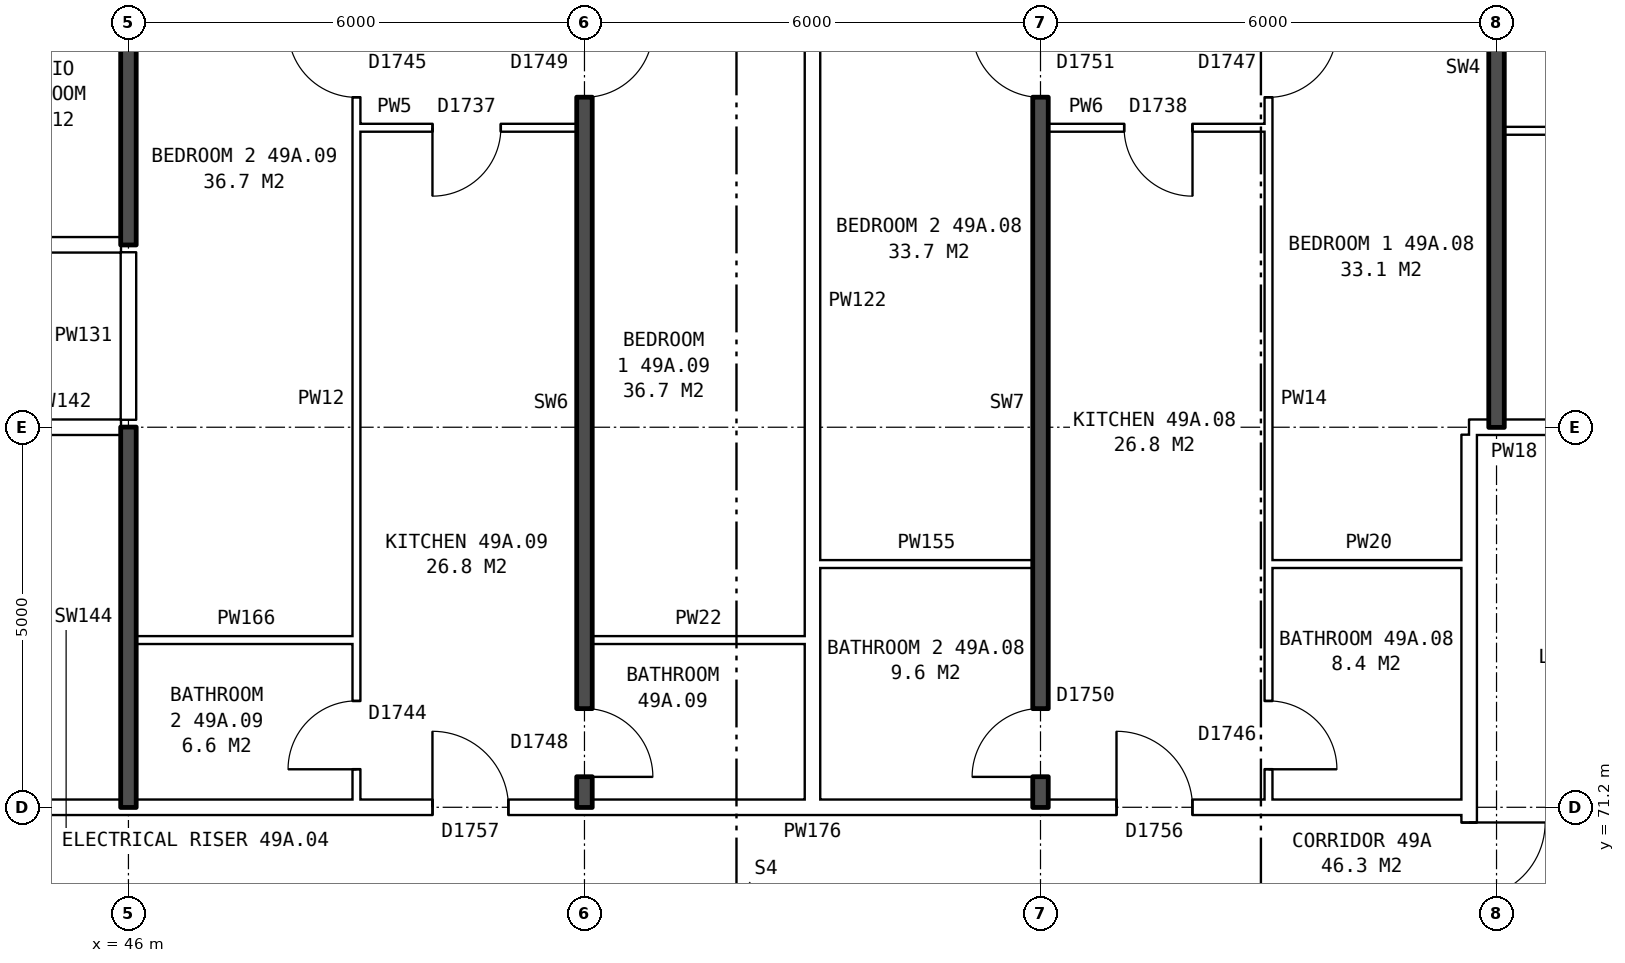
"""IFC4 building model, lengths in metres.
Left out: names, types, materials, properties, quantities, classifications, styles, units other than length and angle.
Written with IfcOpenShell. Run it as: python <this file> out.ifc"""

import sys

from ifc_helpers import new_model, si_unit, direction, frame, frame_2d, origin, place, context, subcontext, project, spatial, rectangle, extrude, element, fill, save


model = new_model("IFC4")
c1 = context("Model", 3, precision=1e-05, world=origin(), true_north=direction((0.0, 1.0)))
c2 = subcontext(c1, "Body", "Model", "MODEL_VIEW")
j1 = project(units=[si_unit("LENGTHUNIT", "METRE"), si_unit("PLANEANGLEUNIT", "RADIAN")], contexts=[c1])
p1 = place(None, origin())
s1 = spatial("IfcSite", under=j1, at=p1, CompositionType="ELEMENT")
p2 = place(p1, origin())
s2 = spatial("IfcBuilding", under=s1, at=p2, CompositionType="ELEMENT")
p3 = place(p2, frame((0.0, 0.0, 175.8)))
s3 = spatial("IfcBuildingStorey", under=s2, at=p3, CompositionType="ELEMENT", Elevation=175.8)
p4 = place(p3, frame((63.64, 63.9, 0.0), z_axis=(0.0, 0.0, 1.0), x_axis=(0.0, 1.0, 0.0)))
e1 = element("IfcWall", 1, at=p4, inside=s3, PredefinedType="PARTITIONING", context=c2, shape_type="SweptSolid", body=[
    extrude(rectangle(XDim=12.2, YDim=0.2, at=frame_2d((6.1, 0.0))), origin(), (0.0, 0.0, 1.0), 2.85),
])
p5 = place(p4, frame((5.1, 0.0, 0.0)))
e2 = element("IfcOpeningElement", 2, at=p5, cuts=e1, PredefinedType="OPENING", context=c2, shape_type="SweptSolid", body=[
    extrude(rectangle(XDim=2.0, YDim=2.1, at=frame_2d((1.0, 1.05))), frame((0.0, 0.11, 0.0), z_axis=(0.0, -1.0, 0.0), x_axis=(1.0, 0.0, 0.0)), (0.0, 0.0, 1.0), 0.22),
])
p6 = place(p3, frame((44.36, 71.2, 0.0), z_axis=(0.0, 0.0, 1.0), x_axis=(1.0, 0.0, 0.0)))
e3 = element("IfcWall", 3, at=p6, inside=s3, PredefinedType="PARTITIONING", context=c2, shape_type="SweptSolid", body=[
    extrude(rectangle(XDim=19.28, YDim=0.2, at=frame_2d((9.64, 0.0))), origin(), (0.0, 0.0, 1.0), 2.85),
])
p7 = place(p6, frame((14.64, 0.0, 0.0)))
e4 = element("IfcOpeningElement", 4, at=p7, cuts=e3, PredefinedType="OPENING", context=c2, shape_type="SweptSolid", body=[
    extrude(rectangle(XDim=1.0, YDim=2.1, at=frame_2d((0.5, 1.05))), frame((0.0, 0.11, 0.0), z_axis=(0.0, -1.0, 0.0), x_axis=(1.0, 0.0, 0.0)), (0.0, 0.0, 1.0), 0.22),
])
p8 = place(p6, frame((5.64, 0.0, 0.0)))
e5 = element("IfcOpeningElement", 5, at=p8, cuts=e3, PredefinedType="OPENING", context=c2, shape_type="SweptSolid", body=[
    extrude(rectangle(XDim=1.0, YDim=2.1, at=frame_2d((0.5, 1.05))), frame((0.0, 0.11, 0.0), z_axis=(0.0, -1.0, 0.0), x_axis=(1.0, 0.0, 0.0)), (0.0, 0.0, 1.0), 0.22),
])
p9 = place(p3, frame((46.1, 73.4, 0.0), z_axis=(0.0, 0.0, 1.0), x_axis=(1.0, 0.0, 0.0)))
e6 = element("IfcWall", 6, at=p9, inside=s3, PredefinedType="PARTITIONING", context=c2, shape_type="SweptSolid", body=[
    extrude(rectangle(XDim=2.9, YDim=0.1, at=frame_2d((1.45, 0.0))), origin(), (0.0, 0.0, 1.0), 2.85),
])
for number, where, z_axis, x_axis in (
    (7, (52.1, 73.4, 0.0), (0.0, 0.0, 1.0), (1.0, 0.0, 0.0)),
    (8, (55.1, 74.4, 0.0), (0.0, 0.0, 1.0), (1.0, 0.0, 0.0)),
):
    element("IfcWall", number, at=place(p3, frame(where, z_axis=z_axis, x_axis=x_axis)), inside=s3, PredefinedType="PARTITIONING", context=c2, shape_type="SweptSolid", body=[
        extrude(rectangle(XDim=2.8, YDim=0.1, at=frame_2d((1.4, 0.0))), origin(), (0.0, 0.0, 1.0), 2.85),
    ])
p10 = place(p3, frame((61.0, 74.4, 0.0), z_axis=(0.0, 0.0, 1.0), x_axis=(1.0, 0.0, 0.0)))
e9 = element("IfcWall", 9, at=p10, inside=s3, PredefinedType="PARTITIONING", context=c2, shape_type="SweptSolid", body=[
    extrude(rectangle(XDim=2.64, YDim=0.1, at=frame_2d((1.32, 0.0))), origin(), (0.0, 0.0, 1.0), 2.85),
])
p11 = place(p3, frame((44.36, 76.2, 0.0), z_axis=(0.0, 0.0, 1.0), x_axis=(1.0, 0.0, 0.0)))
e10 = element("IfcWall", 10, at=p11, inside=s3, PredefinedType="PARTITIONING", context=c2, shape_type="SweptSolid", body=[
    extrude(rectangle(XDim=1.54, YDim=0.2, at=frame_2d((0.77, 0.0))), origin(), (0.0, 0.0, 1.0), 2.85),
])
p12 = place(p3, frame((63.64, 76.2, 0.0), z_axis=(0.0, 0.0, 1.0), x_axis=(1.0, 0.0, 0.0)))
e11 = element("IfcWall", 11, at=p12, inside=s3, PredefinedType="PARTITIONING", context=c2, shape_type="SweptSolid", body=[
    extrude(rectangle(XDim=3.0, YDim=0.2, at=frame_2d((1.5, 0.0))), origin(), (0.0, 0.0, 1.0), 2.85),
])
p13 = place(p12, frame((1.18, 0.0, 0.0)))
e12 = element("IfcOpeningElement", 12, at=p13, cuts=e11, PredefinedType="OPENING", context=c2, shape_type="SweptSolid", body=[
    extrude(rectangle(XDim=1.0, YDim=2.1, at=frame_2d((0.5, 1.05))), frame((0.0, 0.11, 0.0), z_axis=(0.0, -1.0, 0.0), x_axis=(1.0, 0.0, 0.0)), (0.0, 0.0, 1.0), 0.22),
])
p14 = place(p3, frame((30.61, 78.6, 0.0), z_axis=(0.0, 0.0, 1.0), x_axis=(1.0, 0.0, 0.0)))
e13 = element("IfcWall", 13, at=p14, inside=s3, PredefinedType="PARTITIONING", context=c2, shape_type="SweptSolid", body=[
    extrude(rectangle(XDim=15.29, YDim=0.2, at=frame_2d((7.645, 0.0))), origin(), (0.0, 0.0, 1.0), 2.85),
])
p15 = place(p14, frame((10.69, 0.0, 0.0)))
e14 = element("IfcOpeningElement", 14, at=p15, cuts=e13, PredefinedType="OPENING", context=c2, shape_type="SweptSolid", body=[
    extrude(rectangle(XDim=1.0, YDim=2.1, at=frame_2d((0.5, 1.05))), frame((0.0, 0.11, 0.0), z_axis=(0.0, -1.0, 0.0), x_axis=(1.0, 0.0, 0.0)), (0.0, 0.0, 1.0), 0.22),
])
p16 = place(p14, frame((5.89, 0.0, 0.0)))
e15 = element("IfcOpeningElement", 15, at=p16, cuts=e13, PredefinedType="OPENING", context=c2, shape_type="SweptSolid", body=[
    extrude(rectangle(XDim=1.0, YDim=2.1, at=frame_2d((0.5, 1.05))), frame((0.0, 0.11, 0.0), z_axis=(0.0, -1.0, 0.0), x_axis=(1.0, 0.0, 0.0)), (0.0, 0.0, 1.0), 0.22),
])
p17 = place(p3, frame((64.1, 80.1, 0.0), z_axis=(0.0, 0.0, 1.0), x_axis=(1.0, 0.0, 0.0)))
e16 = element("IfcWall", 16, at=p17, inside=s3, PredefinedType="PARTITIONING", context=c2, shape_type="SweptSolid", body=[
    extrude(rectangle(XDim=5.8, YDim=0.1, at=frame_2d((2.9, 0.0))), origin(), (0.0, 0.0, 1.0), 2.85),
])
p18 = place(p17, frame((3.6, 0.0, 0.0)))
e17 = element("IfcOpeningElement", 17, at=p18, cuts=e16, PredefinedType="OPENING", context=c2, shape_type="SweptSolid", body=[
    extrude(rectangle(XDim=0.9, YDim=2.1, at=frame_2d((0.45, 1.05))), frame((0.0, 0.06, 0.0), z_axis=(0.0, -1.0, 0.0), x_axis=(1.0, 0.0, 0.0)), (0.0, 0.0, 1.0), 0.12),
])
p19 = place(p17, frame((0.7, 0.0, 0.0)))
e18 = element("IfcOpeningElement", 18, at=p19, cuts=e16, PredefinedType="OPENING", context=c2, shape_type="SweptSolid", body=[
    extrude(rectangle(XDim=0.9, YDim=2.1, at=frame_2d((0.45, 1.05))), frame((0.0, 0.06, 0.0), z_axis=(0.0, -1.0, 0.0), x_axis=(1.0, 0.0, 0.0)), (0.0, 0.0, 1.0), 0.12),
])
p20 = place(p3, frame((49.0, 80.14, 0.0), z_axis=(0.0, 0.0, 1.0), x_axis=(1.0, 0.0, 0.0)))
e19 = element("IfcWall", 19, at=p20, inside=s3, PredefinedType="PARTITIONING", context=c2, shape_type="SweptSolid", body=[
    extrude(rectangle(XDim=2.9, YDim=0.1, at=frame_2d((1.45, 0.0))), origin(), (0.0, 0.0, 1.0), 2.85),
])
p21 = place(p20, frame((1.0, 0.0, 0.0)))
e20 = element("IfcOpeningElement", 20, at=p21, cuts=e19, PredefinedType="OPENING", context=c2, shape_type="SweptSolid", body=[
    extrude(rectangle(XDim=0.9, YDim=2.1, at=frame_2d((0.45, 1.05))), frame((0.0, 0.06, 0.0), z_axis=(0.0, -1.0, 0.0), x_axis=(1.0, 0.0, 0.0)), (0.0, 0.0, 1.0), 0.12),
])
p22 = place(p3, frame((58.1, 80.14, 0.0), z_axis=(0.0, 0.0, 1.0), x_axis=(1.0, 0.0, 0.0)))
e21 = element("IfcWall", 21, at=p22, inside=s3, PredefinedType="PARTITIONING", context=c2, shape_type="SweptSolid", body=[
    extrude(rectangle(XDim=2.9, YDim=0.1, at=frame_2d((1.45, 0.0))), origin(), (0.0, 0.0, 1.0), 2.85),
])
p23 = place(p22, frame((1.0, 0.0, 0.0)))
e22 = element("IfcOpeningElement", 22, at=p23, cuts=e21, PredefinedType="OPENING", context=c2, shape_type="SweptSolid", body=[
    extrude(rectangle(XDim=0.9, YDim=2.1, at=frame_2d((0.45, 1.05))), frame((0.0, 0.06, 0.0), z_axis=(0.0, -1.0, 0.0), x_axis=(1.0, 0.0, 0.0)), (0.0, 0.0, 1.0), 0.12),
])
p24 = place(p3, frame((46.0, 71.2, 0.0), z_axis=(0.0, 0.0, 1.0), x_axis=(0.0, 1.0, 0.0)))
e23 = element("IfcWall", 23, at=p24, inside=s3, PredefinedType="SOLIDWALL", context=c2, shape_type="SweptSolid", body=[
    extrude(rectangle(XDim=5.0, YDim=0.2, at=frame_2d((2.5, 0.0))), origin(), (0.0, 0.0, 1.0), 2.85),
])
p25 = place(p3, frame((46.0, 76.3, 0.0), z_axis=(0.0, 0.0, 1.0), x_axis=(0.0, 1.0, 0.0)))
e24 = element("IfcWall", 24, at=p25, inside=s3, PredefinedType="PARTITIONING", context=c2, shape_type="SweptSolid", body=[
    extrude(rectangle(XDim=2.2, YDim=0.2, at=frame_2d((1.1, 0.0))), origin(), (0.0, 0.0, 1.0), 2.85),
])
p26 = place(p3, frame((46.0, 78.6, 0.0), z_axis=(0.0, 0.0, 1.0), x_axis=(0.0, 1.0, 0.0)))
e25 = element("IfcWall", 25, at=p26, inside=s3, PredefinedType="SOLIDWALL", context=c2, shape_type="SweptSolid", body=[
    extrude(rectangle(XDim=7.04, YDim=0.2, at=frame_2d((3.52, 0.0))), origin(), (0.0, 0.0, 1.0), 2.85),
])
p27 = place(p3, frame((49.0, 71.3, 0.0), z_axis=(0.0, 0.0, 1.0), x_axis=(0.0, 1.0, 0.0)))
e26 = element("IfcWall", 26, at=p27, inside=s3, PredefinedType="PARTITIONING", context=c2, shape_type="SweptSolid", body=[
    extrude(rectangle(XDim=14.34, YDim=0.1, at=frame_2d((7.17, 0.0))), origin(), (0.0, 0.0, 1.0), 2.85),
])
p28 = place(p27, frame((9.24, 0.0, 0.0)))
e27 = element("IfcOpeningElement", 27, at=p28, cuts=e26, PredefinedType="OPENING", context=c2, shape_type="SweptSolid", body=[
    extrude(rectangle(XDim=0.9, YDim=2.1, at=frame_2d((0.45, 1.05))), frame((0.0, 0.06, 0.0), z_axis=(0.0, -1.0, 0.0), x_axis=(1.0, 0.0, 0.0)), (0.0, 0.0, 1.0), 0.12),
])
p29 = place(p27, frame((0.4, 0.0, 0.0)))
e28 = element("IfcOpeningElement", 28, at=p29, cuts=e26, PredefinedType="OPENING", context=c2, shape_type="SweptSolid", body=[
    extrude(rectangle(XDim=0.9, YDim=2.1, at=frame_2d((0.45, 1.05))), frame((0.0, 0.06, 0.0), z_axis=(0.0, -1.0, 0.0), x_axis=(1.0, 0.0, 0.0)), (0.0, 0.0, 1.0), 0.12),
])
p30 = place(p3, frame((52.0, 71.2, 0.0), z_axis=(0.0, 0.0, 1.0), x_axis=(0.0, 1.0, 0.0)))
e29 = element("IfcWall", 29, at=p30, inside=s3, PredefinedType="SOLIDWALL", context=c2, shape_type="SweptSolid", body=[
    extrude(rectangle(XDim=14.44, YDim=0.2, at=frame_2d((7.22, 0.0))), origin(), (0.0, 0.0, 1.0), 2.85),
])
p31 = place(p30, frame((9.34, 0.0, 0.0)))
e30 = element("IfcOpeningElement", 30, at=p31, cuts=e29, PredefinedType="OPENING", context=c2, shape_type="SweptSolid", body=[
    extrude(rectangle(XDim=0.9, YDim=2.1, at=frame_2d((0.45, 1.05))), frame((0.0, 0.11, 0.0), z_axis=(0.0, -1.0, 0.0), x_axis=(1.0, 0.0, 0.0)), (0.0, 0.0, 1.0), 0.22),
])
p32 = place(p30, frame((0.4, 0.0, 0.0)))
e31 = element("IfcOpeningElement", 31, at=p32, cuts=e29, PredefinedType="OPENING", context=c2, shape_type="SweptSolid", body=[
    extrude(rectangle(XDim=0.9, YDim=2.1, at=frame_2d((0.45, 1.05))), frame((0.0, 0.11, 0.0), z_axis=(0.0, -1.0, 0.0), x_axis=(1.0, 0.0, 0.0)), (0.0, 0.0, 1.0), 0.22),
])
p33 = place(p3, frame((55.0, 71.3, 0.0), z_axis=(0.0, 0.0, 1.0), x_axis=(0.0, 1.0, 0.0)))
e32 = element("IfcWall", 32, at=p33, inside=s3, PredefinedType="PARTITIONING", context=c2, shape_type="SweptSolid", body=[
    extrude(rectangle(XDim=14.34, YDim=0.2, at=frame_2d((7.17, 0.0))), origin(), (0.0, 0.0, 1.0), 2.85),
])
p34 = place(p3, frame((58.0, 71.2, 0.0), z_axis=(0.0, 0.0, 1.0), x_axis=(0.0, 1.0, 0.0)))
e33 = element("IfcWall", 33, at=p34, inside=s3, PredefinedType="SOLIDWALL", context=c2, shape_type="SweptSolid", body=[
    extrude(rectangle(XDim=14.44, YDim=0.2, at=frame_2d((7.22, 0.0))), origin(), (0.0, 0.0, 1.0), 2.85),
])
p35 = place(p34, frame((9.34, 0.0, 0.0)))
e34 = element("IfcOpeningElement", 34, at=p35, cuts=e33, PredefinedType="OPENING", context=c2, shape_type="SweptSolid", body=[
    extrude(rectangle(XDim=0.9, YDim=2.1, at=frame_2d((0.45, 1.05))), frame((0.0, 0.11, 0.0), z_axis=(0.0, -1.0, 0.0), x_axis=(1.0, 0.0, 0.0)), (0.0, 0.0, 1.0), 0.22),
])
p36 = place(p34, frame((0.4, 0.0, 0.0)))
e35 = element("IfcOpeningElement", 35, at=p36, cuts=e33, PredefinedType="OPENING", context=c2, shape_type="SweptSolid", body=[
    extrude(rectangle(XDim=0.9, YDim=2.1, at=frame_2d((0.45, 1.05))), frame((0.0, 0.11, 0.0), z_axis=(0.0, -1.0, 0.0), x_axis=(1.0, 0.0, 0.0)), (0.0, 0.0, 1.0), 0.22),
])
p37 = place(p3, frame((61.0, 71.3, 0.0), z_axis=(0.0, 0.0, 1.0), x_axis=(0.0, 1.0, 0.0)))
e36 = element("IfcWall", 36, at=p37, inside=s3, PredefinedType="PARTITIONING", context=c2, shape_type="SweptSolid", body=[
    extrude(rectangle(XDim=14.34, YDim=0.1, at=frame_2d((7.17, 0.0))), origin(), (0.0, 0.0, 1.0), 2.85),
])
p38 = place(p37, frame((9.24, 0.0, 0.0)))
e37 = element("IfcOpeningElement", 37, at=p38, cuts=e36, PredefinedType="OPENING", context=c2, shape_type="SweptSolid", body=[
    extrude(rectangle(XDim=0.9, YDim=2.1, at=frame_2d((0.45, 1.05))), frame((0.0, 0.06, 0.0), z_axis=(0.0, -1.0, 0.0), x_axis=(1.0, 0.0, 0.0)), (0.0, 0.0, 1.0), 0.12),
])
p39 = place(p37, frame((0.4, 0.0, 0.0)))
e38 = element("IfcOpeningElement", 38, at=p39, cuts=e36, PredefinedType="OPENING", context=c2, shape_type="SweptSolid", body=[
    extrude(rectangle(XDim=0.9, YDim=2.1, at=frame_2d((0.45, 1.05))), frame((0.0, 0.06, 0.0), z_axis=(0.0, -1.0, 0.0), x_axis=(1.0, 0.0, 0.0)), (0.0, 0.0, 1.0), 0.12),
])
p40 = place(p3, frame((64.0, 76.2, 0.0), z_axis=(0.0, 0.0, 1.0), x_axis=(0.0, 1.0, 0.0)))
e39 = element("IfcWall", 39, at=p40, inside=s3, PredefinedType="SOLIDWALL", context=c2, shape_type="SweptSolid", body=[
    extrude(rectangle(XDim=9.44, YDim=0.2, at=frame_2d((4.72, 0.0))), origin(), (0.0, 0.0, 1.0), 2.85),
])
p41 = place(p5, frame((2.0, 0.0, 0.0), z_axis=(0.0, 0.0, 1.0), x_axis=(-1.0, 0.0, 0.0)))
e40 = element("IfcDoor", 40, at=p41, inside=s3, OperationType="DOUBLE_DOOR_SINGLE_SWING", PredefinedType="DOOR", context=c2, shape_type="SweptSolid", body=[
    extrude(rectangle(XDim=2.0, YDim=2.1, at=frame_2d((1.0, 1.05))), frame((0.0, 0.025, 0.0), z_axis=(0.0, -1.0, 0.0), x_axis=(1.0, 0.0, 0.0)), (0.0, 0.0, 1.0), 0.05),
])
fill(e2, e40)
p42 = place(p38, frame((0.9, 0.0, 0.0), z_axis=(0.0, 0.0, 1.0), x_axis=(-1.0, 0.0, 0.0)))
e41 = element("IfcDoor", 41, at=p42, inside=s3, OperationType="SINGLE_SWING_LEFT", PredefinedType="DOOR", context=c2, shape_type="SweptSolid", body=[
    extrude(rectangle(XDim=0.9, YDim=2.1, at=frame_2d((0.45, 1.05))), frame((0.0, 0.025, 0.0), z_axis=(0.0, -1.0, 0.0), x_axis=(1.0, 0.0, 0.0)), (0.0, 0.0, 1.0), 0.05),
])
fill(e37, e41)
p43 = place(p35, origin())
e42 = element("IfcDoor", 42, at=p43, inside=s3, OperationType="SINGLE_SWING_RIGHT", PredefinedType="DOOR", context=c2, shape_type="SweptSolid", body=[
    extrude(rectangle(XDim=0.9, YDim=2.1, at=frame_2d((0.45, 1.05))), frame((0.0, 0.025, 0.0), z_axis=(0.0, -1.0, 0.0), x_axis=(1.0, 0.0, 0.0)), (0.0, 0.0, 1.0), 0.05),
])
fill(e34, e42)
p44 = place(p7, origin())
e43 = element("IfcDoor", 43, at=p44, inside=s3, OperationType="SINGLE_SWING_LEFT", PredefinedType="DOOR", context=c2, shape_type="SweptSolid", body=[
    extrude(rectangle(XDim=1.0, YDim=2.1, at=frame_2d((0.5, 1.05))), frame((0.0, 0.025, 0.0), z_axis=(0.0, -1.0, 0.0), x_axis=(1.0, 0.0, 0.0)), (0.0, 0.0, 1.0), 0.05),
])
fill(e4, e43)
p45 = place(p23, frame((0.9, 0.0, 0.0), z_axis=(0.0, 0.0, 1.0), x_axis=(-1.0, 0.0, 0.0)))
e44 = element("IfcDoor", 44, at=p45, inside=s3, OperationType="SINGLE_SWING_LEFT", PredefinedType="DOOR", context=c2, shape_type="SweptSolid", body=[
    extrude(rectangle(XDim=0.9, YDim=2.1, at=frame_2d((0.45, 1.05))), frame((0.0, 0.025, 0.0), z_axis=(0.0, -1.0, 0.0), x_axis=(1.0, 0.0, 0.0)), (0.0, 0.0, 1.0), 0.05),
])
fill(e22, e44)
p46 = place(p39, frame((0.9, 0.0, 0.0), z_axis=(0.0, 0.0, 1.0), x_axis=(-1.0, 0.0, 0.0)))
e45 = element("IfcDoor", 45, at=p46, inside=s3, OperationType="SINGLE_SWING_RIGHT", PredefinedType="DOOR", context=c2, shape_type="SweptSolid", body=[
    extrude(rectangle(XDim=0.9, YDim=2.1, at=frame_2d((0.45, 1.05))), frame((0.0, 0.025, 0.0), z_axis=(0.0, -1.0, 0.0), x_axis=(1.0, 0.0, 0.0)), (0.0, 0.0, 1.0), 0.05),
])
fill(e38, e45)
p47 = place(p36, origin())
e46 = element("IfcDoor", 46, at=p47, inside=s3, OperationType="SINGLE_SWING_LEFT", PredefinedType="DOOR", context=c2, shape_type="SweptSolid", body=[
    extrude(rectangle(XDim=0.9, YDim=2.1, at=frame_2d((0.45, 1.05))), frame((0.0, 0.025, 0.0), z_axis=(0.0, -1.0, 0.0), x_axis=(1.0, 0.0, 0.0)), (0.0, 0.0, 1.0), 0.05),
])
fill(e35, e46)
p48 = place(p31, frame((0.9, 0.0, 0.0), z_axis=(0.0, 0.0, 1.0), x_axis=(-1.0, 0.0, 0.0)))
e47 = element("IfcDoor", 47, at=p48, inside=s3, OperationType="SINGLE_SWING_LEFT", PredefinedType="DOOR", context=c2, shape_type="SweptSolid", body=[
    extrude(rectangle(XDim=0.9, YDim=2.1, at=frame_2d((0.45, 1.05))), frame((0.0, 0.025, 0.0), z_axis=(0.0, -1.0, 0.0), x_axis=(1.0, 0.0, 0.0)), (0.0, 0.0, 1.0), 0.05),
])
fill(e30, e47)
p49 = place(p28, origin())
e48 = element("IfcDoor", 48, at=p49, inside=s3, OperationType="SINGLE_SWING_RIGHT", PredefinedType="DOOR", context=c2, shape_type="SweptSolid", body=[
    extrude(rectangle(XDim=0.9, YDim=2.1, at=frame_2d((0.45, 1.05))), frame((0.0, 0.025, 0.0), z_axis=(0.0, -1.0, 0.0), x_axis=(1.0, 0.0, 0.0)), (0.0, 0.0, 1.0), 0.05),
])
fill(e27, e48)
p50 = place(p8, origin())
e49 = element("IfcDoor", 49, at=p50, inside=s3, OperationType="SINGLE_SWING_LEFT", PredefinedType="DOOR", context=c2, shape_type="SweptSolid", body=[
    extrude(rectangle(XDim=1.0, YDim=2.1, at=frame_2d((0.5, 1.05))), frame((0.0, 0.025, 0.0), z_axis=(0.0, -1.0, 0.0), x_axis=(1.0, 0.0, 0.0)), (0.0, 0.0, 1.0), 0.05),
])
fill(e5, e49)
p51 = place(p21, frame((0.9, 0.0, 0.0), z_axis=(0.0, 0.0, 1.0), x_axis=(-1.0, 0.0, 0.0)))
e50 = element("IfcDoor", 50, at=p51, inside=s3, OperationType="SINGLE_SWING_RIGHT", PredefinedType="DOOR", context=c2, shape_type="SweptSolid", body=[
    extrude(rectangle(XDim=0.9, YDim=2.1, at=frame_2d((0.45, 1.05))), frame((0.0, 0.025, 0.0), z_axis=(0.0, -1.0, 0.0), x_axis=(1.0, 0.0, 0.0)), (0.0, 0.0, 1.0), 0.05),
])
fill(e20, e50)
p52 = place(p32, frame((0.9, 0.0, 0.0), z_axis=(0.0, 0.0, 1.0), x_axis=(-1.0, 0.0, 0.0)))
e51 = element("IfcDoor", 51, at=p52, inside=s3, OperationType="SINGLE_SWING_RIGHT", PredefinedType="DOOR", context=c2, shape_type="SweptSolid", body=[
    extrude(rectangle(XDim=0.9, YDim=2.1, at=frame_2d((0.45, 1.05))), frame((0.0, 0.025, 0.0), z_axis=(0.0, -1.0, 0.0), x_axis=(1.0, 0.0, 0.0)), (0.0, 0.0, 1.0), 0.05),
])
fill(e31, e51)
p53 = place(p29, origin())
e52 = element("IfcDoor", 52, at=p53, inside=s3, OperationType="SINGLE_SWING_LEFT", PredefinedType="DOOR", context=c2, shape_type="SweptSolid", body=[
    extrude(rectangle(XDim=0.9, YDim=2.1, at=frame_2d((0.45, 1.05))), frame((0.0, 0.025, 0.0), z_axis=(0.0, -1.0, 0.0), x_axis=(1.0, 0.0, 0.0)), (0.0, 0.0, 1.0), 0.05),
])
fill(e28, e52)
save(model, sys.argv[1])
